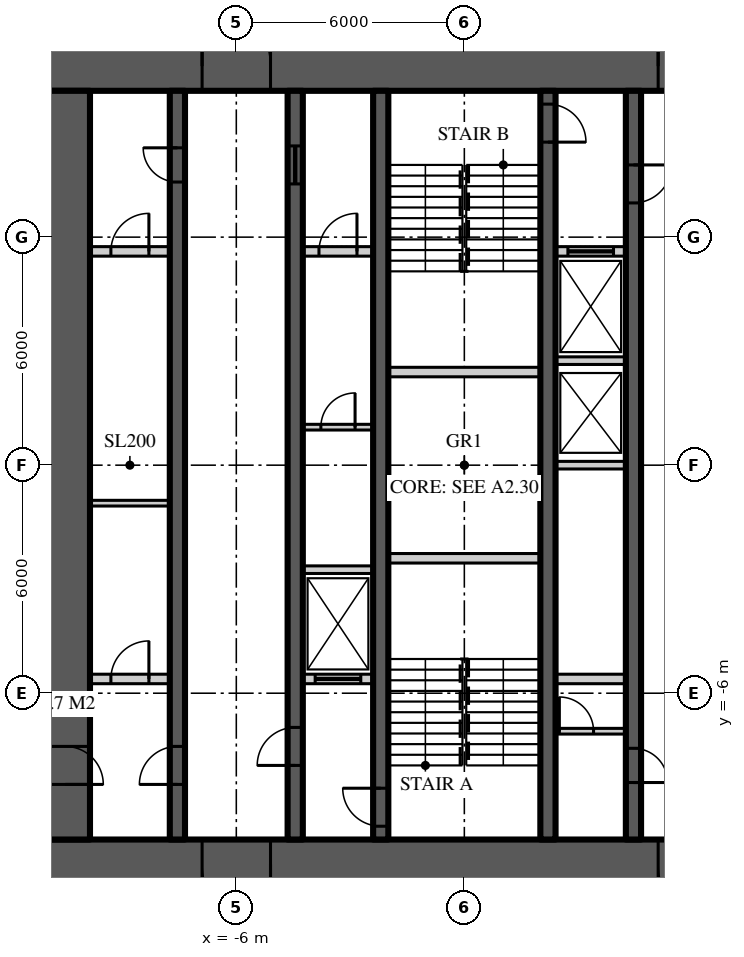
"""IFC4 building model, lengths in metres.
Left out: names, types, materials, properties, quantities, classifications, styles, units other than length and angle.
Written with IfcOpenShell. Run it as: python <this file> out.ifc"""

import sys

from ifc_helpers import new_model, si_unit, direction, frame, frame_2d, origin, place, context, subcontext, project, spatial, rectangle, extrude, element, fill, save


model = new_model("IFC4")
c1 = context("Model", 3, precision=1e-05, world=origin(), true_north=direction((0.0, 1.0)))
c2 = subcontext(c1, "Body", "Model", "MODEL_VIEW")
j1 = project(units=[si_unit("LENGTHUNIT", "METRE"), si_unit("PLANEANGLEUNIT", "RADIAN")], contexts=[c1])
p1 = place(None, origin())
s1 = spatial("IfcSite", under=j1, at=p1, CompositionType="ELEMENT")
p2 = place(p1, origin())
s2 = spatial("IfcBuilding", under=s1, at=p2, CompositionType="ELEMENT")
p3 = place(p2, frame((0.0, 0.0, 216.6)))
s3 = spatial("IfcBuildingStorey", under=s2, at=p3, CompositionType="ELEMENT", Elevation=216.6)
p4 = place(p3, frame((-11.15, 10.5, 0.0), z_axis=(0.0, 0.0, 1.0), x_axis=(1.0, 0.0, 0.0)))
e1 = element("IfcWall", 1, at=p4, inside=s3, PredefinedType="SHEAR", context=c2, shape_type="SweptSolid", body=[
    extrude(rectangle(XDim=22.3, YDim=1.3, at=frame_2d((11.15, 0.0))), origin(), (0.0, 0.0, 1.0), 3.9),
])
p5 = place(p4, frame((4.25, 0.0, 0.0)))
e2 = element("IfcOpeningElement", 2, at=p5, cuts=e1, PredefinedType="OPENING", context=c2, shape_type="SweptSolid", body=[
    extrude(rectangle(XDim=1.8, YDim=2.2, at=frame_2d((0.9, 1.1))), frame((0.0, 0.66, 0.0), z_axis=(0.0, -1.0, 0.0), x_axis=(1.0, 0.0, 0.0)), (0.0, 0.0, 1.0), 1.32),
])
p6 = place(p4, frame((16.25, 0.0, 0.0)))
e3 = element("IfcOpeningElement", 3, at=p6, cuts=e1, PredefinedType="OPENING", context=c2, shape_type="SweptSolid", body=[
    extrude(rectangle(XDim=1.8, YDim=2.2, at=frame_2d((0.9, 1.1))), frame((0.0, 0.66, 0.0), z_axis=(0.0, -1.0, 0.0), x_axis=(1.0, 0.0, 0.0)), (0.0, 0.0, 1.0), 1.32),
])
p7 = place(p3, frame((11.15, -10.5, 0.0), z_axis=(0.0, 0.0, 1.0), x_axis=(-1.0, 0.0, 0.0)))
e4 = element("IfcWall", 4, at=p7, inside=s3, PredefinedType="SHEAR", context=c2, shape_type="SweptSolid", body=[
    extrude(rectangle(XDim=22.3, YDim=1.3, at=frame_2d((11.15, 0.0))), origin(), (0.0, 0.0, 1.0), 3.9),
])
p8 = place(p7, frame((16.25, 0.0, 0.0)))
e5 = element("IfcOpeningElement", 5, at=p8, cuts=e4, PredefinedType="OPENING", context=c2, shape_type="SweptSolid", body=[
    extrude(rectangle(XDim=1.8, YDim=2.2, at=frame_2d((0.9, 1.1))), frame((0.0, 0.66, 0.0), z_axis=(0.0, -1.0, 0.0), x_axis=(1.0, 0.0, 0.0)), (0.0, 0.0, 1.0), 1.32),
])
p9 = place(p7, frame((4.25, 0.0, 0.0)))
e6 = element("IfcOpeningElement", 6, at=p9, cuts=e4, PredefinedType="OPENING", context=c2, shape_type="SweptSolid", body=[
    extrude(rectangle(XDim=1.8, YDim=2.2, at=frame_2d((0.9, 1.1))), frame((0.0, 0.66, 0.0), z_axis=(0.0, -1.0, 0.0), x_axis=(1.0, 0.0, 0.0)), (0.0, 0.0, 1.0), 1.32),
])
p10 = place(p3, frame((-10.5, 9.85, 0.0), z_axis=(0.0, 0.0, 1.0), x_axis=(0.0, -1.0, 0.0)))
e7 = element("IfcWall", 7, at=p10, inside=s3, PredefinedType="SHEAR", context=c2, shape_type="SweptSolid", body=[
    extrude(rectangle(XDim=19.7, YDim=1.3, at=frame_2d((9.85, 0.0))), origin(), (0.0, 0.0, 1.0), 3.9),
])
p11 = place(p10, frame((17.25, 0.0, 0.0)))
e8 = element("IfcOpeningElement", 8, at=p11, cuts=e7, PredefinedType="OPENING", context=c2, shape_type="SweptSolid", body=[
    extrude(rectangle(XDim=1.0, YDim=2.2, at=frame_2d((0.5, 1.1))), frame((0.0, 0.66, 0.0), z_axis=(0.0, -1.0, 0.0), x_axis=(1.0, 0.0, 0.0)), (0.0, 0.0, 1.0), 1.32),
])
p12 = place(p3, frame((-7.55, -9.85, 0.0), z_axis=(0.0, 0.0, 1.0), x_axis=(0.0, 1.0, 0.0)))
e9 = element("IfcWall", 9, at=p12, inside=s3, PredefinedType="SHEAR", context=c2, shape_type="SweptSolid", body=[
    extrude(rectangle(XDim=19.7, YDim=0.4, at=frame_2d((9.85, 0.0))), origin(), (0.0, 0.0, 1.0), 3.9),
])
p13 = place(p12, frame((1.45, 0.0, 0.0)))
e10 = element("IfcOpeningElement", 10, at=p13, cuts=e9, PredefinedType="OPENING", context=c2, shape_type="SweptSolid", body=[
    extrude(rectangle(XDim=1.0, YDim=2.2, at=frame_2d((0.5, 1.1))), frame((0.0, 0.21, 0.0), z_axis=(0.0, -1.0, 0.0), x_axis=(1.0, 0.0, 0.0)), (0.0, 0.0, 1.0), 0.42),
])
p14 = place(p12, frame((17.3, 0.0, 0.0)))
e11 = element("IfcOpeningElement", 11, at=p14, cuts=e9, PredefinedType="OPENING", context=c2, shape_type="SweptSolid", body=[
    extrude(rectangle(XDim=0.9, YDim=2.1, at=frame_2d((0.45, 1.05))), frame((0.0, 0.21, 0.0), z_axis=(0.0, -1.0, 0.0), x_axis=(1.0, 0.0, 0.0)), (0.0, 0.0, 1.0), 0.42),
])
p15 = place(p3, frame((-4.45, -9.85, 0.0), z_axis=(0.0, 0.0, 1.0), x_axis=(0.0, 1.0, 0.0)))
e12 = element("IfcWall", 12, at=p15, inside=s3, PredefinedType="SHEAR", context=c2, shape_type="SweptSolid", body=[
    extrude(rectangle(XDim=19.7, YDim=0.4, at=frame_2d((9.85, 0.0))), origin(), (0.0, 0.0, 1.0), 3.9),
])
p16 = place(p15, frame((1.95, 0.0, 0.0)))
e13 = element("IfcOpeningElement", 13, at=p16, cuts=e12, PredefinedType="OPENING", context=c2, shape_type="SweptSolid", body=[
    extrude(rectangle(XDim=1.0, YDim=2.2, at=frame_2d((0.5, 1.1))), frame((0.0, 0.21, 0.0), z_axis=(0.0, -1.0, 0.0), x_axis=(1.0, 0.0, 0.0)), (0.0, 0.0, 1.0), 0.42),
])
p17 = place(p15, frame((17.25, 0.0, 0.0)))
e14 = element("IfcOpeningElement", 14, at=p17, cuts=e12, PredefinedType="OPENING", context=c2, shape_type="SweptSolid", body=[
    extrude(rectangle(XDim=1.0, YDim=2.1, at=frame_2d((0.5, 1.05))), frame((0.0, 0.21, 0.0), z_axis=(0.0, -1.0, 0.0), x_axis=(1.0, 0.0, 0.0)), (0.0, 0.0, 1.0), 0.42),
])
p18 = place(p3, frame((4.45, 9.85, 0.0), z_axis=(0.0, 0.0, 1.0), x_axis=(0.0, -1.0, 0.0)))
e15 = element("IfcWall", 15, at=p18, inside=s3, PredefinedType="SHEAR", context=c2, shape_type="SweptSolid", body=[
    extrude(rectangle(XDim=19.7, YDim=0.4, at=frame_2d((9.85, 0.0))), origin(), (0.0, 0.0, 1.0), 3.9),
])
p19 = place(p18, frame((1.95, 0.0, 0.0)))
e16 = element("IfcOpeningElement", 16, at=p19, cuts=e15, PredefinedType="OPENING", context=c2, shape_type="SweptSolid", body=[
    extrude(rectangle(XDim=1.0, YDim=2.2, at=frame_2d((0.5, 1.1))), frame((0.0, 0.21, 0.0), z_axis=(0.0, -1.0, 0.0), x_axis=(1.0, 0.0, 0.0)), (0.0, 0.0, 1.0), 0.42),
])
p20 = place(p18, frame((17.3, 0.0, 0.0)))
e17 = element("IfcOpeningElement", 17, at=p20, cuts=e15, PredefinedType="OPENING", context=c2, shape_type="SweptSolid", body=[
    extrude(rectangle(XDim=0.9, YDim=2.1, at=frame_2d((0.45, 1.05))), frame((0.0, 0.21, 0.0), z_axis=(0.0, -1.0, 0.0), x_axis=(1.0, 0.0, 0.0)), (0.0, 0.0, 1.0), 0.42),
])
p21 = place(p3, frame((-2.2, -9.85, 0.0), z_axis=(0.0, 0.0, 1.0), x_axis=(0.0, 1.0, 0.0)))
e18 = element("IfcWall", 18, at=p21, inside=s3, PredefinedType="SHEAR", context=c2, shape_type="SweptSolid", body=[
    extrude(rectangle(XDim=19.7, YDim=0.4, at=frame_2d((9.85, 0.0))), origin(), (0.0, 0.0, 1.0), 3.9),
])
p22 = place(p21, frame((0.35, 0.0, 0.0)))
e19 = element("IfcOpeningElement", 19, at=p22, cuts=e18, PredefinedType="OPENING", context=c2, shape_type="SweptSolid", body=[
    extrude(rectangle(XDim=1.0, YDim=2.2, at=frame_2d((0.5, 1.1))), frame((0.0, 0.21, 0.0), z_axis=(0.0, -1.0, 0.0), x_axis=(1.0, 0.0, 0.0)), (0.0, 0.0, 1.0), 0.42),
])
p23 = place(p3, frame((2.2, 9.85, 0.0), z_axis=(0.0, 0.0, 1.0), x_axis=(0.0, -1.0, 0.0)))
e20 = element("IfcWall", 20, at=p23, inside=s3, PredefinedType="SHEAR", context=c2, shape_type="SweptSolid", body=[
    extrude(rectangle(XDim=19.7, YDim=0.4, at=frame_2d((9.85, 0.0))), origin(), (0.0, 0.0, 1.0), 3.9),
])
p24 = place(p23, frame((0.35, 0.0, 0.0)))
e21 = element("IfcOpeningElement", 21, at=p24, cuts=e20, PredefinedType="OPENING", context=c2, shape_type="SweptSolid", body=[
    extrude(rectangle(XDim=1.0, YDim=2.2, at=frame_2d((0.5, 1.1))), frame((0.0, 0.21, 0.0), z_axis=(0.0, -1.0, 0.0), x_axis=(1.0, 0.0, 0.0)), (0.0, 0.0, 1.0), 0.42),
])
p25 = place(p3, frame((-9.85, 5.625, 0.0), z_axis=(0.0, 0.0, 1.0), x_axis=(1.0, 0.0, 0.0)))
e22 = element("IfcWall", 22, at=p25, inside=s3, PredefinedType="SOLIDWALL", context=c2, shape_type="SweptSolid", body=[
    extrude(rectangle(XDim=2.1, YDim=0.25, at=frame_2d((1.05, 0.0))), origin(), (0.0, 0.0, 1.0), 3.7),
])
p26 = place(p25, frame((0.55, 0.0, 0.0)))
e23 = element("IfcOpeningElement", 23, at=p26, cuts=e22, PredefinedType="OPENING", context=c2, shape_type="SweptSolid", body=[
    extrude(rectangle(XDim=1.0, YDim=2.2, at=frame_2d((0.5, 1.1))), frame((0.0, 0.135, 0.0), z_axis=(0.0, -1.0, 0.0), x_axis=(1.0, 0.0, 0.0)), (0.0, 0.0, 1.0), 0.27),
])
p27 = place(p3, frame((-4.25, 5.625, 0.0), z_axis=(0.0, 0.0, 1.0), x_axis=(1.0, 0.0, 0.0)))
e24 = element("IfcWall", 24, at=p27, inside=s3, PredefinedType="SOLIDWALL", context=c2, shape_type="SweptSolid", body=[
    extrude(rectangle(XDim=1.85, YDim=0.25, at=frame_2d((0.925, 0.0))), origin(), (0.0, 0.0, 1.0), 3.7),
])
p28 = place(p27, frame((0.425, 0.0, 0.0)))
e25 = element("IfcOpeningElement", 25, at=p28, cuts=e24, PredefinedType="OPENING", context=c2, shape_type="SweptSolid", body=[
    extrude(rectangle(XDim=1.0, YDim=2.2, at=frame_2d((0.5, 1.1))), frame((0.0, 0.135, 0.0), z_axis=(0.0, -1.0, 0.0), x_axis=(1.0, 0.0, 0.0)), (0.0, 0.0, 1.0), 0.27),
])
p29 = place(p3, frame((2.4, 5.625, 0.0), z_axis=(0.0, 0.0, 1.0), x_axis=(1.0, 0.0, 0.0)))
e26 = element("IfcWall", 26, at=p29, inside=s3, PredefinedType="SOLIDWALL", context=c2, shape_type="SweptSolid", body=[
    extrude(rectangle(XDim=1.85, YDim=0.25, at=frame_2d((0.925, 0.0))), origin(), (0.0, 0.0, 1.0), 3.7),
])
p30 = place(p29, frame((0.325, 0.0, 0.0)))
e27 = element("IfcOpeningElement", 27, at=p30, cuts=e26, PredefinedType="OPENING", context=c2, shape_type="SweptSolid", body=[
    extrude(rectangle(XDim=1.2, YDim=2.2, at=frame_2d((0.6, 1.1))), frame((0.0, 0.135, 0.0), z_axis=(0.0, -1.0, 0.0), x_axis=(1.0, 0.0, 0.0)), (0.0, 0.0, 1.0), 0.27),
])
p31 = place(p3, frame((-9.85, -5.625, 0.0), z_axis=(0.0, 0.0, 1.0), x_axis=(1.0, 0.0, 0.0)))
e28 = element("IfcWall", 28, at=p31, inside=s3, PredefinedType="SOLIDWALL", context=c2, shape_type="SweptSolid", body=[
    extrude(rectangle(XDim=2.1, YDim=0.25, at=frame_2d((1.05, 0.0))), origin(), (0.0, 0.0, 1.0), 3.7),
])
p32 = place(p31, frame((0.55, 0.0, 0.0)))
e29 = element("IfcOpeningElement", 29, at=p32, cuts=e28, PredefinedType="OPENING", context=c2, shape_type="SweptSolid", body=[
    extrude(rectangle(XDim=1.0, YDim=2.2, at=frame_2d((0.5, 1.1))), frame((0.0, 0.135, 0.0), z_axis=(0.0, -1.0, 0.0), x_axis=(1.0, 0.0, 0.0)), (0.0, 0.0, 1.0), 0.27),
])
p33 = place(p3, frame((-4.25, -5.625, 0.0), z_axis=(0.0, 0.0, 1.0), x_axis=(1.0, 0.0, 0.0)))
e30 = element("IfcWall", 30, at=p33, inside=s3, PredefinedType="SOLIDWALL", context=c2, shape_type="SweptSolid", body=[
    extrude(rectangle(XDim=1.85, YDim=0.25, at=frame_2d((0.925, 0.0))), origin(), (0.0, 0.0, 1.0), 3.7),
])
p34 = place(p33, frame((0.325, 0.0, 0.0)))
e31 = element("IfcOpeningElement", 31, at=p34, cuts=e30, PredefinedType="OPENING", context=c2, shape_type="SweptSolid", body=[
    extrude(rectangle(XDim=1.2, YDim=2.2, at=frame_2d((0.6, 1.1))), frame((0.0, 0.135, 0.0), z_axis=(0.0, -1.0, 0.0), x_axis=(1.0, 0.0, 0.0)), (0.0, 0.0, 1.0), 0.27),
])
p35 = place(p3, frame((2.4, -5.625, 0.0), z_axis=(0.0, 0.0, 1.0), x_axis=(1.0, 0.0, 0.0)))
e32 = element("IfcWall", 32, at=p35, inside=s3, PredefinedType="SOLIDWALL", context=c2, shape_type="SweptSolid", body=[
    extrude(rectangle(XDim=1.85, YDim=0.25, at=frame_2d((0.925, 0.0))), origin(), (0.0, 0.0, 1.0), 3.7),
])
for number, where, z_axis, x_axis in (
    (33, (-2.0, -2.45, 0.0), (0.0, 0.0, 1.0), (1.0, 0.0, 0.0)),
    (34, (-2.0, 2.45, 0.0), (0.0, 0.0, 1.0), (1.0, 0.0, 0.0)),
):
    element("IfcWall", number, at=place(p3, frame(where, z_axis=z_axis, x_axis=x_axis)), inside=s3, PredefinedType="SOLIDWALL", context=c2, shape_type="SweptSolid", body=[
        extrude(rectangle(XDim=4.0, YDim=0.25, at=frame_2d((2.0, 0.0))), origin(), (0.0, 0.0, 1.0), 3.7),
    ])
for number, where, z_axis, x_axis in (
    (35, (-4.25, -2.75, 0.0), (0.0, 0.0, 1.0), (1.0, 0.0, 0.0)),
    (36, (2.4, 0.0, 0.0), (0.0, 0.0, 1.0), (1.0, 0.0, 0.0)),
    (37, (2.4, 2.75, 0.0), (0.0, 0.0, 1.0), (1.0, 0.0, 0.0)),
):
    element("IfcWall", number, at=place(p3, frame(where, z_axis=z_axis, x_axis=x_axis)), inside=s3, PredefinedType="SOLIDWALL", context=c2, shape_type="SweptSolid", body=[
        extrude(rectangle(XDim=1.85, YDim=0.2, at=frame_2d((0.925, 0.0))), origin(), (0.0, 0.0, 1.0), 3.7),
    ])
p36 = place(p3, frame((-9.85, -1.0, 0.0), z_axis=(0.0, 0.0, 1.0), x_axis=(1.0, 0.0, 0.0)))
e38 = element("IfcWall", 38, at=p36, inside=s3, PredefinedType="SOLIDWALL", context=c2, shape_type="SweptSolid", body=[
    extrude(rectangle(XDim=2.1, YDim=0.15, at=frame_2d((1.05, 0.0))), origin(), (0.0, 0.0, 1.0), 3.77),
])
p37 = place(p3, frame((-4.25, 1.0, 0.0), z_axis=(0.0, 0.0, 1.0), x_axis=(1.0, 0.0, 0.0)))
e39 = element("IfcWall", 39, at=p37, inside=s3, PredefinedType="SOLIDWALL", context=c2, shape_type="SweptSolid", body=[
    extrude(rectangle(XDim=1.85, YDim=0.15, at=frame_2d((0.925, 0.0))), origin(), (0.0, 0.0, 1.0), 3.77),
])
p38 = place(p37, frame((0.475, 0.0, 0.0)))
e40 = element("IfcOpeningElement", 40, at=p38, cuts=e39, PredefinedType="OPENING", context=c2, shape_type="SweptSolid", body=[
    extrude(rectangle(XDim=0.9, YDim=2.1, at=frame_2d((0.45, 1.05))), frame((0.0, 0.085, 0.0), z_axis=(0.0, -1.0, 0.0), x_axis=(1.0, 0.0, 0.0)), (0.0, 0.0, 1.0), 0.17),
])
p39 = place(p3, frame((2.4, -7.0, 0.0), z_axis=(0.0, 0.0, 1.0), x_axis=(1.0, 0.0, 0.0)))
e41 = element("IfcWall", 41, at=p39, inside=s3, PredefinedType="SOLIDWALL", context=c2, shape_type="SweptSolid", body=[
    extrude(rectangle(XDim=1.85, YDim=0.15, at=frame_2d((0.925, 0.0))), origin(), (0.0, 0.0, 1.0), 3.77),
])
p40 = place(p39, frame((0.1, 0.0, 0.0)))
e42 = element("IfcOpeningElement", 42, at=p40, cuts=e41, PredefinedType="OPENING", context=c2, shape_type="SweptSolid", body=[
    extrude(rectangle(XDim=0.9, YDim=2.1, at=frame_2d((0.45, 1.05))), frame((0.0, 0.085, 0.0), z_axis=(0.0, -1.0, 0.0), x_axis=(1.0, 0.0, 0.0)), (0.0, 0.0, 1.0), 0.17),
])
p41 = place(p5, origin())
e43 = element("IfcDoor", 43, at=p41, inside=s3, OperationType="DOUBLE_DOOR_DOUBLE_SWING", PredefinedType="DOOR", context=c2, shape_type="SweptSolid", body=[
    extrude(rectangle(XDim=1.8, YDim=2.2, at=frame_2d((0.9, 1.1))), frame((0.0, 0.025, 0.0), z_axis=(0.0, -1.0, 0.0), x_axis=(1.0, 0.0, 0.0)), (0.0, 0.0, 1.0), 0.05),
])
fill(e2, e43)
p42 = place(p8, origin())
e44 = element("IfcDoor", 44, at=p42, inside=s3, OperationType="DOUBLE_DOOR_DOUBLE_SWING", PredefinedType="DOOR", context=c2, shape_type="SweptSolid", body=[
    extrude(rectangle(XDim=1.8, YDim=2.2, at=frame_2d((0.9, 1.1))), frame((0.0, 0.025, 0.0), z_axis=(0.0, -1.0, 0.0), x_axis=(1.0, 0.0, 0.0)), (0.0, 0.0, 1.0), 0.05),
])
fill(e5, e44)
p43 = place(p6, origin())
e45 = element("IfcDoor", 45, at=p43, inside=s3, OperationType="DOUBLE_DOOR_DOUBLE_SWING", PredefinedType="DOOR", context=c2, shape_type="SweptSolid", body=[
    extrude(rectangle(XDim=1.8, YDim=2.2, at=frame_2d((0.9, 1.1))), frame((0.0, 0.025, 0.0), z_axis=(0.0, -1.0, 0.0), x_axis=(1.0, 0.0, 0.0)), (0.0, 0.0, 1.0), 0.05),
])
fill(e3, e45)
p44 = place(p9, origin())
e46 = element("IfcDoor", 46, at=p44, inside=s3, OperationType="DOUBLE_DOOR_DOUBLE_SWING", PredefinedType="DOOR", context=c2, shape_type="SweptSolid", body=[
    extrude(rectangle(XDim=1.8, YDim=2.2, at=frame_2d((0.9, 1.1))), frame((0.0, 0.025, 0.0), z_axis=(0.0, -1.0, 0.0), x_axis=(1.0, 0.0, 0.0)), (0.0, 0.0, 1.0), 0.05),
])
fill(e6, e46)
p45 = place(p13, origin())
e47 = element("IfcDoor", 47, at=p45, inside=s3, OperationType="SINGLE_SWING_LEFT", PredefinedType="DOOR", context=c2, shape_type="SweptSolid", body=[
    extrude(rectangle(XDim=1.0, YDim=2.2, at=frame_2d((0.5, 1.1))), frame((0.0, 0.025, 0.0), z_axis=(0.0, -1.0, 0.0), x_axis=(1.0, 0.0, 0.0)), (0.0, 0.0, 1.0), 0.05),
])
fill(e10, e47)
p46 = place(p11, origin())
e48 = element("IfcDoor", 48, at=p46, inside=s3, OperationType="SINGLE_SWING_RIGHT", PredefinedType="DOOR", context=c2, shape_type="SweptSolid", body=[
    extrude(rectangle(XDim=1.0, YDim=2.2, at=frame_2d((0.5, 1.1))), frame((0.0, 0.025, 0.0), z_axis=(0.0, -1.0, 0.0), x_axis=(1.0, 0.0, 0.0)), (0.0, 0.0, 1.0), 0.05),
])
fill(e8, e48)
p47 = place(p16, origin())
e49 = element("IfcDoor", 49, at=p47, inside=s3, OperationType="SINGLE_SWING_LEFT", PredefinedType="DOOR", context=c2, shape_type="SweptSolid", body=[
    extrude(rectangle(XDim=1.0, YDim=2.2, at=frame_2d((0.5, 1.1))), frame((0.0, 0.025, 0.0), z_axis=(0.0, -1.0, 0.0), x_axis=(1.0, 0.0, 0.0)), (0.0, 0.0, 1.0), 0.05),
])
fill(e13, e49)
p48 = place(p22, origin())
e50 = element("IfcDoor", 50, at=p48, inside=s3, OperationType="SINGLE_SWING_RIGHT", PredefinedType="DOOR", context=c2, shape_type="SweptSolid", body=[
    extrude(rectangle(XDim=1.0, YDim=2.2, at=frame_2d((0.5, 1.1))), frame((0.0, 0.025, 0.0), z_axis=(0.0, -1.0, 0.0), x_axis=(1.0, 0.0, 0.0)), (0.0, 0.0, 1.0), 0.05),
])
fill(e19, e50)
p49 = place(p19, origin())
e51 = element("IfcDoor", 51, at=p49, inside=s3, OperationType="SINGLE_SWING_LEFT", PredefinedType="DOOR", context=c2, shape_type="SweptSolid", body=[
    extrude(rectangle(XDim=1.0, YDim=2.2, at=frame_2d((0.5, 1.1))), frame((0.0, 0.025, 0.0), z_axis=(0.0, -1.0, 0.0), x_axis=(1.0, 0.0, 0.0)), (0.0, 0.0, 1.0), 0.05),
])
fill(e16, e51)
p50 = place(p24, origin())
e52 = element("IfcDoor", 52, at=p50, inside=s3, OperationType="SINGLE_SWING_RIGHT", PredefinedType="DOOR", context=c2, shape_type="SweptSolid", body=[
    extrude(rectangle(XDim=1.0, YDim=2.2, at=frame_2d((0.5, 1.1))), frame((0.0, 0.025, 0.0), z_axis=(0.0, -1.0, 0.0), x_axis=(1.0, 0.0, 0.0)), (0.0, 0.0, 1.0), 0.05),
])
fill(e21, e52)
p51 = place(p14, origin())
e53 = element("IfcDoor", 53, at=p51, inside=s3, OperationType="SINGLE_SWING_RIGHT", PredefinedType="DOOR", context=c2, shape_type="SweptSolid", body=[
    extrude(rectangle(XDim=0.9, YDim=2.1, at=frame_2d((0.45, 1.05))), frame((0.0, 0.025, 0.0), z_axis=(0.0, -1.0, 0.0), x_axis=(1.0, 0.0, 0.0)), (0.0, 0.0, 1.0), 0.05),
])
fill(e11, e53)
p52 = place(p17, origin())
e54 = element("IfcDoor", 54, at=p52, inside=s3, OperationType="SLIDING_TO_LEFT", PredefinedType="DOOR", context=c2, shape_type="SweptSolid", body=[
    extrude(rectangle(XDim=1.0, YDim=2.1, at=frame_2d((0.5, 1.05))), frame((0.0, 0.025, 0.0), z_axis=(0.0, -1.0, 0.0), x_axis=(1.0, 0.0, 0.0)), (0.0, 0.0, 1.0), 0.05),
])
fill(e14, e54)
p53 = place(p20, origin())
e55 = element("IfcDoor", 55, at=p53, inside=s3, OperationType="SINGLE_SWING_RIGHT", PredefinedType="DOOR", context=c2, shape_type="SweptSolid", body=[
    extrude(rectangle(XDim=0.9, YDim=2.1, at=frame_2d((0.45, 1.05))), frame((0.0, 0.025, 0.0), z_axis=(0.0, -1.0, 0.0), x_axis=(1.0, 0.0, 0.0)), (0.0, 0.0, 1.0), 0.05),
])
fill(e17, e55)
p54 = place(p34, origin())
e56 = element("IfcDoor", 56, at=p54, inside=s3, OperationType="SLIDING_TO_LEFT", PredefinedType="DOOR", context=c2, shape_type="SweptSolid", body=[
    extrude(rectangle(XDim=1.2, YDim=2.2, at=frame_2d((0.6, 1.1))), frame((0.0, 0.025, 0.0), z_axis=(0.0, -1.0, 0.0), x_axis=(1.0, 0.0, 0.0)), (0.0, 0.0, 1.0), 0.05),
])
fill(e31, e56)
p55 = place(p30, origin())
e57 = element("IfcDoor", 57, at=p55, inside=s3, OperationType="SLIDING_TO_LEFT", PredefinedType="DOOR", context=c2, shape_type="SweptSolid", body=[
    extrude(rectangle(XDim=1.2, YDim=2.2, at=frame_2d((0.6, 1.1))), frame((0.0, 0.025, 0.0), z_axis=(0.0, -1.0, 0.0), x_axis=(1.0, 0.0, 0.0)), (0.0, 0.0, 1.0), 0.05),
])
fill(e27, e57)
p56 = place(p26, origin())
e58 = element("IfcDoor", 58, at=p56, inside=s3, OperationType="SINGLE_SWING_RIGHT", PredefinedType="DOOR", context=c2, shape_type="SweptSolid", body=[
    extrude(rectangle(XDim=1.0, YDim=2.2, at=frame_2d((0.5, 1.1))), frame((0.0, 0.025, 0.0), z_axis=(0.0, -1.0, 0.0), x_axis=(1.0, 0.0, 0.0)), (0.0, 0.0, 1.0), 0.05),
])
fill(e23, e58)
p57 = place(p32, origin())
e59 = element("IfcDoor", 59, at=p57, inside=s3, OperationType="SINGLE_SWING_RIGHT", PredefinedType="DOOR", context=c2, shape_type="SweptSolid", body=[
    extrude(rectangle(XDim=1.0, YDim=2.2, at=frame_2d((0.5, 1.1))), frame((0.0, 0.025, 0.0), z_axis=(0.0, -1.0, 0.0), x_axis=(1.0, 0.0, 0.0)), (0.0, 0.0, 1.0), 0.05),
])
fill(e29, e59)
p58 = place(p38, origin())
e60 = element("IfcDoor", 60, at=p58, inside=s3, OperationType="SINGLE_SWING_RIGHT", PredefinedType="DOOR", context=c2, shape_type="SweptSolid", body=[
    extrude(rectangle(XDim=0.9, YDim=2.1, at=frame_2d((0.45, 1.05))), frame((0.0, 0.025, 0.0), z_axis=(0.0, -1.0, 0.0), x_axis=(1.0, 0.0, 0.0)), (0.0, 0.0, 1.0), 0.05),
])
fill(e40, e60)
p59 = place(p28, origin())
e61 = element("IfcDoor", 61, at=p59, inside=s3, OperationType="SINGLE_SWING_RIGHT", PredefinedType="DOOR", context=c2, shape_type="SweptSolid", body=[
    extrude(rectangle(XDim=1.0, YDim=2.2, at=frame_2d((0.5, 1.1))), frame((0.0, 0.025, 0.0), z_axis=(0.0, -1.0, 0.0), x_axis=(1.0, 0.0, 0.0)), (0.0, 0.0, 1.0), 0.05),
])
fill(e25, e61)
p60 = place(p40, origin())
e62 = element("IfcDoor", 62, at=p60, inside=s3, OperationType="SINGLE_SWING_LEFT", PredefinedType="DOOR", context=c2, shape_type="SweptSolid", body=[
    extrude(rectangle(XDim=0.9, YDim=2.1, at=frame_2d((0.45, 1.05))), frame((0.0, 0.025, 0.0), z_axis=(0.0, -1.0, 0.0), x_axis=(1.0, 0.0, 0.0)), (0.0, 0.0, 1.0), 0.05),
])
fill(e42, e62)
save(model, sys.argv[1])
